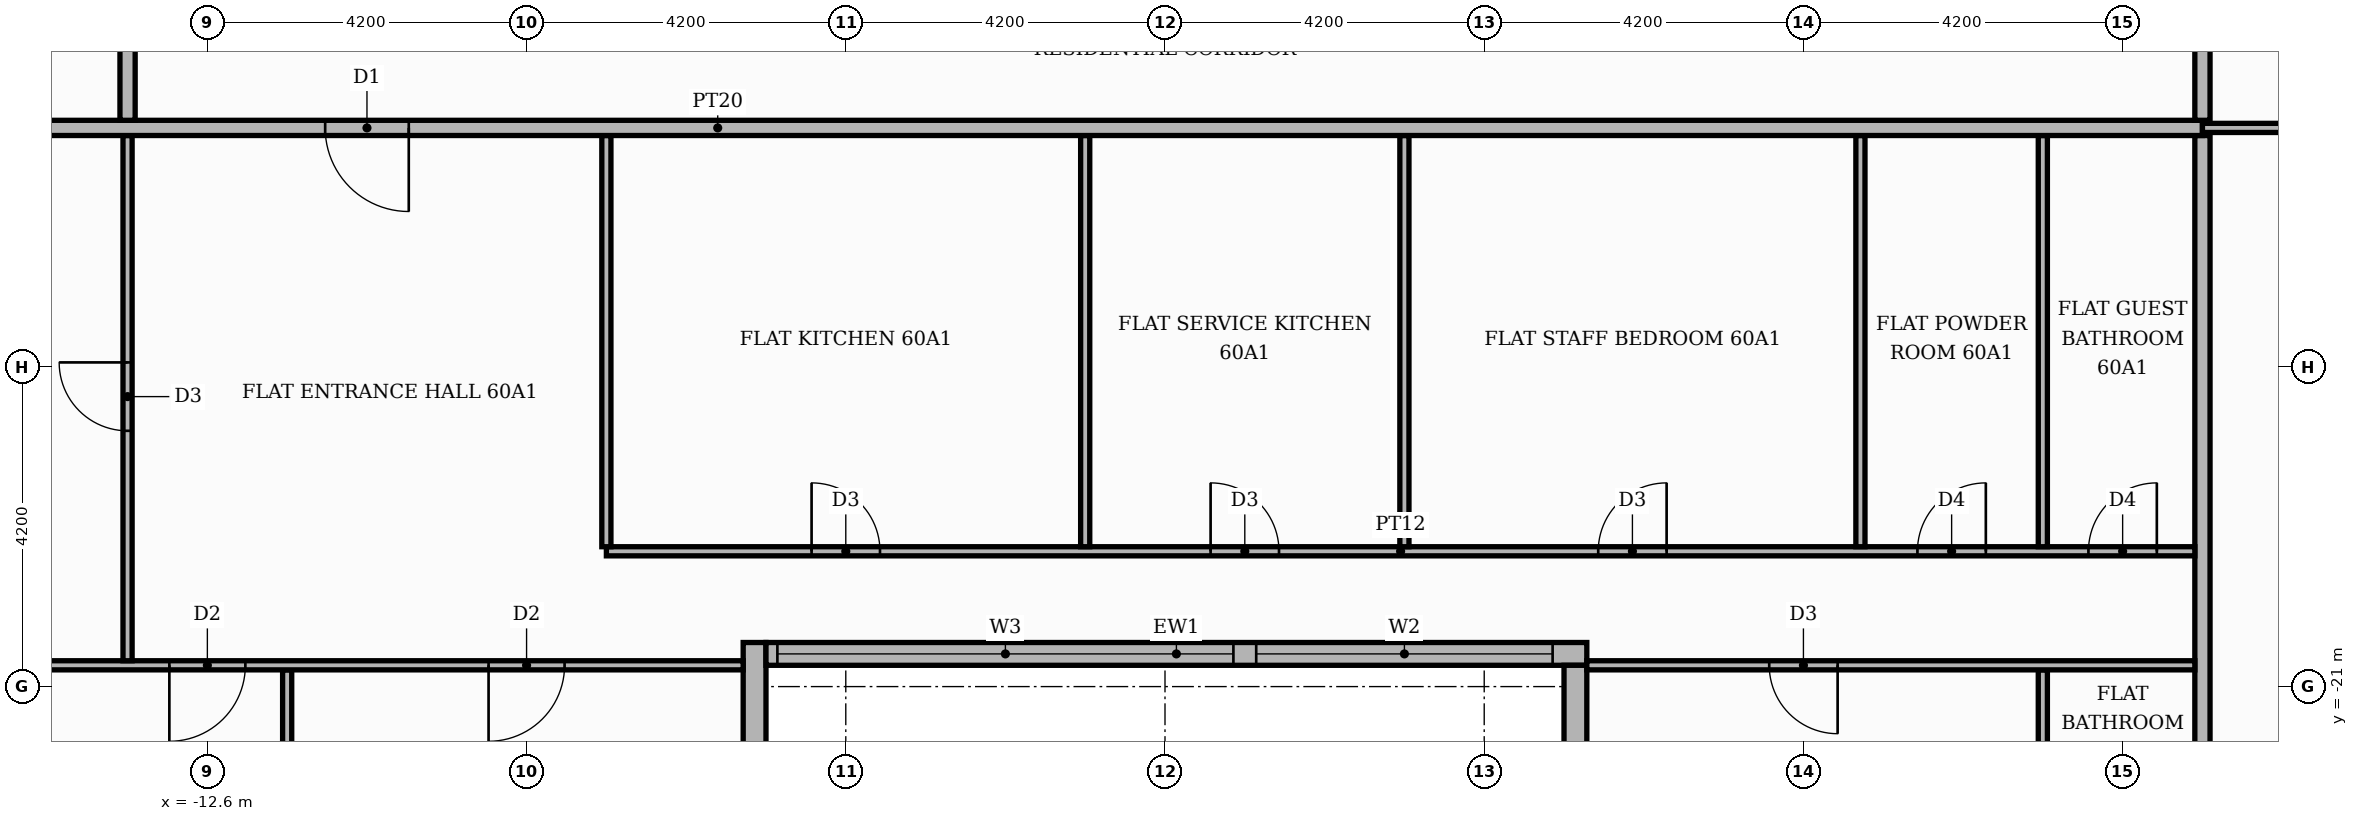
"""IFC4 building model, lengths in metres.
Left out: names, types, materials, properties, quantities, classifications, styles, units other than length and angle.
Written with IfcOpenShell. Run it as: python <this file> out.ifc"""

import sys

from ifc_helpers import new_model, si_unit, direction, frame, frame_2d, origin, place, context, subcontext, project, spatial, rectangle, extrude, element, fill, save


model = new_model("IFC4")
c1 = context("Model", 3, precision=1e-05, world=origin(), true_north=direction((0.0, 1.0)))
c2 = subcontext(c1, "Body", "Model", "MODEL_VIEW")
j1 = project(units=[si_unit("LENGTHUNIT", "METRE"), si_unit("PLANEANGLEUNIT", "RADIAN")], contexts=[c1])
p1 = place(None, origin())
s1 = spatial("IfcSite", under=j1, at=p1, CompositionType="ELEMENT")
p2 = place(p1, origin())
s2 = spatial("IfcBuilding", under=s1, at=p2, CompositionType="ELEMENT")
p3 = place(p2, frame((0.0, 0.0, 252.3)))
s3 = spatial("IfcBuildingStorey", under=s2, at=p3, CompositionType="ELEMENT", Elevation=252.3)
p4 = place(p3, frame((-5.4, -25.42, 0.0), z_axis=(0.0, 0.0, 1.0), x_axis=(0.0, 1.0, 0.0)))
e1 = element("IfcWall", 1, at=p4, inside=s3, PredefinedType="STANDARD", context=c2, shape_type="SweptSolid", body=[
    extrude(rectangle(XDim=5.0, YDim=0.3, at=frame_2d((2.5, 0.0))), origin(), (0.0, 0.0, 1.0), 3.48),
])
p5 = place(p4, frame((1.42, 0.0, 0.9)))
e2 = element("IfcOpeningElement", 2, at=p5, cuts=e1, PredefinedType="OPENING", context=c2, shape_type="SweptSolid", body=[
    extrude(rectangle(XDim=1.8, YDim=2.1, at=frame_2d((0.9, 1.05))), frame((0.0, 0.16, 0.0), z_axis=(0.0, -1.0, 0.0), x_axis=(1.0, 0.0, 0.0)), (0.0, 0.0, 1.0), 0.32),
])
p6 = place(p3, frame((-5.25, -20.57, 0.0), z_axis=(0.0, 0.0, 1.0), x_axis=(1.0, 0.0, 0.0)))
e3 = element("IfcWall", 3, at=p6, inside=s3, PredefinedType="STANDARD", context=c2, shape_type="SweptSolid", body=[
    extrude(rectangle(XDim=10.8, YDim=0.3, at=frame_2d((5.4, 0.0))), origin(), (0.0, 0.0, 1.0), 3.48),
])
p7 = place(p6, frame((0.15, 0.0, 0.9)))
e4 = element("IfcOpeningElement", 4, at=p7, cuts=e3, PredefinedType="OPENING", context=c2, shape_type="SweptSolid", body=[
    extrude(rectangle(XDim=6.0, YDim=2.1, at=frame_2d((3.0, 1.05))), frame((0.0, 0.16, 0.0), z_axis=(0.0, -1.0, 0.0), x_axis=(1.0, 0.0, 0.0)), (0.0, 0.0, 1.0), 0.32),
])
p8 = place(p6, frame((6.45, 0.0, 0.9)))
e5 = element("IfcOpeningElement", 5, at=p8, cuts=e3, PredefinedType="OPENING", context=c2, shape_type="SweptSolid", body=[
    extrude(rectangle(XDim=3.9, YDim=2.1, at=frame_2d((1.95, 1.05))), frame((0.0, 0.16, 0.0), z_axis=(0.0, -1.0, 0.0), x_axis=(1.0, 0.0, 0.0)), (0.0, 0.0, 1.0), 0.32),
])
p9 = place(p3, frame((5.4, -20.72, 0.0), z_axis=(0.0, 0.0, 1.0), x_axis=(0.0, -1.0, 0.0)))
e6 = element("IfcWall", 6, at=p9, inside=s3, PredefinedType="STANDARD", context=c2, shape_type="SweptSolid", body=[
    extrude(rectangle(XDim=5.0, YDim=0.3, at=frame_2d((2.5, 0.0))), origin(), (0.0, 0.0, 1.0), 3.48),
])
p10 = place(p9, frame((1.48, 0.0, 0.9)))
e7 = element("IfcOpeningElement", 7, at=p10, cuts=e6, PredefinedType="OPENING", context=c2, shape_type="SweptSolid", body=[
    extrude(rectangle(XDim=1.8, YDim=2.1, at=frame_2d((0.9, 1.05))), frame((0.0, 0.16, 0.0), z_axis=(0.0, -1.0, 0.0), x_axis=(1.0, 0.0, 0.0)), (0.0, 0.0, 1.0), 0.32),
])
p11 = place(p3, frame((-11.55, -25.42, 0.0), z_axis=(0.0, 0.0, 1.0), x_axis=(0.0, 1.0, 0.0)))
e8 = element("IfcWall", 8, at=p11, inside=s3, PredefinedType="PARTITIONING", context=c2, shape_type="SweptSolid", body=[
    extrude(rectangle(XDim=4.64, YDim=0.12, at=frame_2d((2.32, 0.0))), origin(), (0.0, 0.0, 1.0), 3.48),
])
p12 = place(p3, frame((11.55, -25.42, 0.0), z_axis=(0.0, 0.0, 1.0), x_axis=(0.0, 1.0, 0.0)))
e9 = element("IfcWall", 9, at=p12, inside=s3, PredefinedType="PARTITIONING", context=c2, shape_type="SweptSolid", body=[
    extrude(rectangle(XDim=4.64, YDim=0.12, at=frame_2d((2.32, 0.0))), origin(), (0.0, 0.0, 1.0), 3.48),
])
p13 = place(p12, frame((1.75, 0.0, 0.0)))
e10 = element("IfcOpeningElement", 10, at=p13, cuts=e9, PredefinedType="OPENING", context=c2, shape_type="SweptSolid", body=[
    extrude(rectangle(XDim=0.9, YDim=2.1, at=frame_2d((0.45, 1.05))), frame((0.0, 0.07, 0.0), z_axis=(0.0, -1.0, 0.0), x_axis=(1.0, 0.0, 0.0)), (0.0, 0.0, 1.0), 0.14),
])
p14 = place(p3, frame((13.65, -25.42, 0.0), z_axis=(0.0, 0.0, 1.0), x_axis=(0.0, 1.0, 0.0)))
e11 = element("IfcWall", 11, at=p14, inside=s3, PredefinedType="PARTITIONING", context=c2, shape_type="SweptSolid", body=[
    extrude(rectangle(XDim=11.67, YDim=0.2, at=frame_2d((5.835, 0.0))), origin(), (0.0, 0.0, 1.0), 3.48),
])
p15 = place(p3, frame((-20.42, -20.72, 0.0), z_axis=(0.0, 0.0, 1.0), x_axis=(1.0, 0.0, 0.0)))
e12 = element("IfcWall", 12, at=p15, inside=s3, PredefinedType="PARTITIONING", context=c2, shape_type="SweptSolid", body=[
    extrude(rectangle(XDim=14.87, YDim=0.12, at=frame_2d((7.435, 0.0))), origin(), (0.0, 0.0, 1.0), 3.48),
])
p16 = place(p15, frame((7.32, 0.0, 0.0)))
e13 = element("IfcOpeningElement", 13, at=p16, cuts=e12, PredefinedType="OPENING", context=c2, shape_type="SweptSolid", body=[
    extrude(rectangle(XDim=1.0, YDim=2.1, at=frame_2d((0.5, 1.05))), frame((0.0, 0.07, 0.0), z_axis=(0.0, -1.0, 0.0), x_axis=(1.0, 0.0, 0.0)), (0.0, 0.0, 1.0), 0.14),
])
p17 = place(p15, frame((11.52, 0.0, 0.0)))
e14 = element("IfcOpeningElement", 14, at=p17, cuts=e12, PredefinedType="OPENING", context=c2, shape_type="SweptSolid", body=[
    extrude(rectangle(XDim=1.0, YDim=2.1, at=frame_2d((0.5, 1.05))), frame((0.0, 0.07, 0.0), z_axis=(0.0, -1.0, 0.0), x_axis=(1.0, 0.0, 0.0)), (0.0, 0.0, 1.0), 0.14),
])
p18 = place(p3, frame((5.55, -20.72, 0.0), z_axis=(0.0, 0.0, 1.0), x_axis=(1.0, 0.0, 0.0)))
e15 = element("IfcWall", 15, at=p18, inside=s3, PredefinedType="PARTITIONING", context=c2, shape_type="SweptSolid", body=[
    extrude(rectangle(XDim=8.0, YDim=0.12, at=frame_2d((4.0, 0.0))), origin(), (0.0, 0.0, 1.0), 3.48),
])
p19 = place(p18, frame((2.4, 0.0, 0.0)))
e16 = element("IfcOpeningElement", 16, at=p19, cuts=e15, PredefinedType="OPENING", context=c2, shape_type="SweptSolid", body=[
    extrude(rectangle(XDim=0.9, YDim=2.1, at=frame_2d((0.45, 1.05))), frame((0.0, 0.07, 0.0), z_axis=(0.0, -1.0, 0.0), x_axis=(1.0, 0.0, 0.0)), (0.0, 0.0, 1.0), 0.14),
])
p20 = place(p3, frame((-13.65, -20.66, 0.0), z_axis=(0.0, 0.0, 1.0), x_axis=(0.0, 1.0, 0.0)))
e17 = element("IfcWall", 17, at=p20, inside=s3, PredefinedType="PARTITIONING", context=c2, shape_type="SweptSolid", body=[
    extrude(rectangle(XDim=6.91, YDim=0.12, at=frame_2d((3.455, 0.0))), origin(), (0.0, 0.0, 1.0), 3.48),
])
p21 = place(p20, frame((3.025, 0.0, 0.0)))
e18 = element("IfcOpeningElement", 18, at=p21, cuts=e17, PredefinedType="OPENING", context=c2, shape_type="SweptSolid", body=[
    extrude(rectangle(XDim=0.9, YDim=2.1, at=frame_2d((0.45, 1.05))), frame((0.0, 0.07, 0.0), z_axis=(0.0, -1.0, 0.0), x_axis=(1.0, 0.0, 0.0)), (0.0, 0.0, 1.0), 0.14),
])
p22 = place(p3, frame((-7.35, -19.22, 0.0), z_axis=(0.0, 0.0, 1.0), x_axis=(1.0, 0.0, 0.0)))
e19 = element("IfcWall", 19, at=p22, inside=s3, PredefinedType="PARTITIONING", context=c2, shape_type="SweptSolid", body=[
    extrude(rectangle(XDim=20.9, YDim=0.12, at=frame_2d((10.45, 0.0))), origin(), (0.0, 0.0, 1.0), 3.48),
])
p23 = place(p22, frame((2.7, 0.0, 0.0)))
e20 = element("IfcOpeningElement", 20, at=p23, cuts=e19, PredefinedType="OPENING", context=c2, shape_type="SweptSolid", body=[
    extrude(rectangle(XDim=0.9, YDim=2.1, at=frame_2d((0.45, 1.05))), frame((0.0, 0.07, 0.0), z_axis=(0.0, -1.0, 0.0), x_axis=(1.0, 0.0, 0.0)), (0.0, 0.0, 1.0), 0.14),
])
p24 = place(p22, frame((7.95, 0.0, 0.0)))
e21 = element("IfcOpeningElement", 21, at=p24, cuts=e19, PredefinedType="OPENING", context=c2, shape_type="SweptSolid", body=[
    extrude(rectangle(XDim=0.9, YDim=2.1, at=frame_2d((0.45, 1.05))), frame((0.0, 0.07, 0.0), z_axis=(0.0, -1.0, 0.0), x_axis=(1.0, 0.0, 0.0)), (0.0, 0.0, 1.0), 0.14),
])
p25 = place(p22, frame((13.05, 0.0, 0.0)))
e22 = element("IfcOpeningElement", 22, at=p25, cuts=e19, PredefinedType="OPENING", context=c2, shape_type="SweptSolid", body=[
    extrude(rectangle(XDim=0.9, YDim=2.1, at=frame_2d((0.45, 1.05))), frame((0.0, 0.07, 0.0), z_axis=(0.0, -1.0, 0.0), x_axis=(1.0, 0.0, 0.0)), (0.0, 0.0, 1.0), 0.14),
])
p26 = place(p22, frame((17.25, 0.0, 0.0)))
e23 = element("IfcOpeningElement", 23, at=p26, cuts=e19, PredefinedType="OPENING", context=c2, shape_type="SweptSolid", body=[
    extrude(rectangle(XDim=0.9, YDim=2.1, at=frame_2d((0.45, 1.05))), frame((0.0, 0.07, 0.0), z_axis=(0.0, -1.0, 0.0), x_axis=(1.0, 0.0, 0.0)), (0.0, 0.0, 1.0), 0.14),
])
p27 = place(p22, frame((19.5, 0.0, 0.0)))
e24 = element("IfcOpeningElement", 24, at=p27, cuts=e19, PredefinedType="OPENING", context=c2, shape_type="SweptSolid", body=[
    extrude(rectangle(XDim=0.9, YDim=2.1, at=frame_2d((0.45, 1.05))), frame((0.0, 0.07, 0.0), z_axis=(0.0, -1.0, 0.0), x_axis=(1.0, 0.0, 0.0)), (0.0, 0.0, 1.0), 0.14),
])
for number, where, z_axis, x_axis in (
    (25, (-7.35, -19.16, 0.0), (0.0, 0.0, 1.0), (0.0, 1.0, 0.0)),
    (26, (-1.05, -19.16, 0.0), (0.0, 0.0, 1.0), (0.0, 1.0, 0.0)),
    (27, (3.15, -19.16, 0.0), (0.0, 0.0, 1.0), (0.0, 1.0, 0.0)),
    (28, (9.15, -19.16, 0.0), (0.0, 0.0, 1.0), (0.0, 1.0, 0.0)),
    (29, (11.55, -19.16, 0.0), (0.0, 0.0, 1.0), (0.0, 1.0, 0.0)),
):
    element("IfcWall", number, at=place(p3, frame(where, z_axis=z_axis, x_axis=x_axis)), inside=s3, PredefinedType="PARTITIONING", context=c2, shape_type="SweptSolid", body=[
        extrude(rectangle(XDim=5.41, YDim=0.12, at=frame_2d((2.705, 0.0))), origin(), (0.0, 0.0, 1.0), 3.48),
    ])
p28 = place(p3, frame((-25.42, -13.65, 0.0), z_axis=(0.0, 0.0, 1.0), x_axis=(1.0, 0.0, 0.0)))
e30 = element("IfcWall", 30, at=p28, inside=s3, PredefinedType="PARTITIONING", context=c2, shape_type="SweptSolid", body=[
    extrude(rectangle(XDim=39.07, YDim=0.2, at=frame_2d((19.535, 0.0))), origin(), (0.0, 0.0, 1.0), 3.48),
])
p29 = place(p28, frame((14.37, 0.0, 0.0)))
e31 = element("IfcOpeningElement", 31, at=p29, cuts=e30, PredefinedType="OPENING", context=c2, shape_type="SweptSolid", body=[
    extrude(rectangle(XDim=1.1, YDim=2.4, at=frame_2d((0.55, 1.2))), frame((0.0, 0.11, 0.0), z_axis=(0.0, -1.0, 0.0), x_axis=(1.0, 0.0, 0.0)), (0.0, 0.0, 1.0), 0.22),
])
p30 = place(p3, frame((13.65, -13.65, 0.0), z_axis=(0.0, 0.0, 1.0), x_axis=(1.0, 0.0, 0.0)))
e32 = element("IfcWall", 32, at=p30, inside=s3, PredefinedType="PARTITIONING", context=c2, shape_type="SweptSolid", body=[
    extrude(rectangle(XDim=6.17, YDim=0.12, at=frame_2d((3.085, 0.0))), origin(), (0.0, 0.0, 1.0), 3.48),
])
p31 = place(p30, frame((2.635, 0.0, 0.0)))
e33 = element("IfcOpeningElement", 33, at=p31, cuts=e32, PredefinedType="OPENING", context=c2, shape_type="SweptSolid", body=[
    extrude(rectangle(XDim=0.9, YDim=2.1, at=frame_2d((0.45, 1.05))), frame((0.0, 0.07, 0.0), z_axis=(0.0, -1.0, 0.0), x_axis=(1.0, 0.0, 0.0)), (0.0, 0.0, 1.0), 0.14),
])
for number, where, z_axis, x_axis in (
    (34, (-13.65, -13.55, 0.0), (0.0, 0.0, 1.0), (0.0, 1.0, 0.0)),
    (35, (13.65, -13.55, 0.0), (0.0, 0.0, 1.0), (0.0, 1.0, 0.0)),
):
    element("IfcWall", number, at=place(p3, frame(where, z_axis=z_axis, x_axis=x_axis)), inside=s3, PredefinedType="PARTITIONING", context=c2, shape_type="SweptSolid", body=[
        extrude(rectangle(XDim=2.45, YDim=0.2, at=frame_2d((1.225, 0.0))), origin(), (0.0, 0.0, 1.0), 3.48),
    ])
p32 = place(p7, origin())
e36 = element("IfcWindow", 36, at=p32, inside=s3, PartitioningType="SINGLE_PANEL", PredefinedType="WINDOW", context=c2, shape_type="SweptSolid", body=[
    extrude(rectangle(XDim=6.0, YDim=2.1, at=frame_2d((3.0, 1.05))), frame((0.0, 0.03, 0.0), z_axis=(0.0, -1.0, 0.0), x_axis=(1.0, 0.0, 0.0)), (0.0, 0.0, 1.0), 0.06),
])
fill(e4, e36)
p33 = place(p8, origin())
e37 = element("IfcWindow", 37, at=p33, inside=s3, PartitioningType="SINGLE_PANEL", PredefinedType="WINDOW", context=c2, shape_type="SweptSolid", body=[
    extrude(rectangle(XDim=3.9, YDim=2.1, at=frame_2d((1.95, 1.05))), frame((0.0, 0.03, 0.0), z_axis=(0.0, -1.0, 0.0), x_axis=(1.0, 0.0, 0.0)), (0.0, 0.0, 1.0), 0.06),
])
fill(e5, e37)
p34 = place(p29, frame((1.1, 0.0, 0.0), z_axis=(0.0, 0.0, 1.0), x_axis=(-1.0, 0.0, 0.0)))
e38 = element("IfcDoor", 38, at=p34, inside=s3, OperationType="SINGLE_SWING_RIGHT", PredefinedType="DOOR", context=c2, shape_type="SweptSolid", body=[
    extrude(rectangle(XDim=1.1, YDim=2.4, at=frame_2d((0.55, 1.2))), frame((0.0, 0.025, 0.0), z_axis=(0.0, -1.0, 0.0), x_axis=(1.0, 0.0, 0.0)), (0.0, 0.0, 1.0), 0.05),
])
fill(e31, e38)
p35 = place(p21, origin())
e39 = element("IfcDoor", 39, at=p35, inside=s3, OperationType="SINGLE_SWING_RIGHT", PredefinedType="DOOR", context=c2, shape_type="SweptSolid", body=[
    extrude(rectangle(XDim=0.9, YDim=2.1, at=frame_2d((0.45, 1.05))), frame((0.0, 0.025, 0.0), z_axis=(0.0, -1.0, 0.0), x_axis=(1.0, 0.0, 0.0)), (0.0, 0.0, 1.0), 0.05),
])
fill(e18, e39)
p36 = place(p23, origin())
e40 = element("IfcDoor", 40, at=p36, inside=s3, OperationType="SINGLE_SWING_LEFT", PredefinedType="DOOR", context=c2, shape_type="SweptSolid", body=[
    extrude(rectangle(XDim=0.9, YDim=2.1, at=frame_2d((0.45, 1.05))), frame((0.0, 0.025, 0.0), z_axis=(0.0, -1.0, 0.0), x_axis=(1.0, 0.0, 0.0)), (0.0, 0.0, 1.0), 0.05),
])
fill(e20, e40)
p37 = place(p24, origin())
e41 = element("IfcDoor", 41, at=p37, inside=s3, OperationType="SINGLE_SWING_LEFT", PredefinedType="DOOR", context=c2, shape_type="SweptSolid", body=[
    extrude(rectangle(XDim=0.9, YDim=2.1, at=frame_2d((0.45, 1.05))), frame((0.0, 0.025, 0.0), z_axis=(0.0, -1.0, 0.0), x_axis=(1.0, 0.0, 0.0)), (0.0, 0.0, 1.0), 0.05),
])
fill(e21, e41)
p38 = place(p25, origin())
e42 = element("IfcDoor", 42, at=p38, inside=s3, OperationType="SINGLE_SWING_RIGHT", PredefinedType="DOOR", context=c2, shape_type="SweptSolid", body=[
    extrude(rectangle(XDim=0.9, YDim=2.1, at=frame_2d((0.45, 1.05))), frame((0.0, 0.025, 0.0), z_axis=(0.0, -1.0, 0.0), x_axis=(1.0, 0.0, 0.0)), (0.0, 0.0, 1.0), 0.05),
])
fill(e22, e42)
p39 = place(p26, origin())
e43 = element("IfcDoor", 43, at=p39, inside=s3, OperationType="SINGLE_SWING_RIGHT", PredefinedType="DOOR", context=c2, shape_type="SweptSolid", body=[
    extrude(rectangle(XDim=0.9, YDim=2.1, at=frame_2d((0.45, 1.05))), frame((0.0, 0.025, 0.0), z_axis=(0.0, -1.0, 0.0), x_axis=(1.0, 0.0, 0.0)), (0.0, 0.0, 1.0), 0.05),
])
fill(e23, e43)
p40 = place(p27, origin())
e44 = element("IfcDoor", 44, at=p40, inside=s3, OperationType="SINGLE_SWING_RIGHT", PredefinedType="DOOR", context=c2, shape_type="SweptSolid", body=[
    extrude(rectangle(XDim=0.9, YDim=2.1, at=frame_2d((0.45, 1.05))), frame((0.0, 0.025, 0.0), z_axis=(0.0, -1.0, 0.0), x_axis=(1.0, 0.0, 0.0)), (0.0, 0.0, 1.0), 0.05),
])
fill(e24, e44)
p41 = place(p16, frame((1.0, 0.0, 0.0), z_axis=(0.0, 0.0, 1.0), x_axis=(-1.0, 0.0, 0.0)))
e45 = element("IfcDoor", 45, at=p41, inside=s3, OperationType="SINGLE_SWING_LEFT", PredefinedType="DOOR", context=c2, shape_type="SweptSolid", body=[
    extrude(rectangle(XDim=1.0, YDim=2.1, at=frame_2d((0.5, 1.05))), frame((0.0, 0.025, 0.0), z_axis=(0.0, -1.0, 0.0), x_axis=(1.0, 0.0, 0.0)), (0.0, 0.0, 1.0), 0.05),
])
fill(e13, e45)
p42 = place(p17, frame((1.0, 0.0, 0.0), z_axis=(0.0, 0.0, 1.0), x_axis=(-1.0, 0.0, 0.0)))
e46 = element("IfcDoor", 46, at=p42, inside=s3, OperationType="SINGLE_SWING_LEFT", PredefinedType="DOOR", context=c2, shape_type="SweptSolid", body=[
    extrude(rectangle(XDim=1.0, YDim=2.1, at=frame_2d((0.5, 1.05))), frame((0.0, 0.025, 0.0), z_axis=(0.0, -1.0, 0.0), x_axis=(1.0, 0.0, 0.0)), (0.0, 0.0, 1.0), 0.05),
])
fill(e14, e46)
p43 = place(p19, frame((0.9, 0.0, 0.0), z_axis=(0.0, 0.0, 1.0), x_axis=(-1.0, 0.0, 0.0)))
e47 = element("IfcDoor", 47, at=p43, inside=s3, OperationType="SINGLE_SWING_RIGHT", PredefinedType="DOOR", context=c2, shape_type="SweptSolid", body=[
    extrude(rectangle(XDim=0.9, YDim=2.1, at=frame_2d((0.45, 1.05))), frame((0.0, 0.025, 0.0), z_axis=(0.0, -1.0, 0.0), x_axis=(1.0, 0.0, 0.0)), (0.0, 0.0, 1.0), 0.05),
])
fill(e16, e47)
save(model, sys.argv[1])
